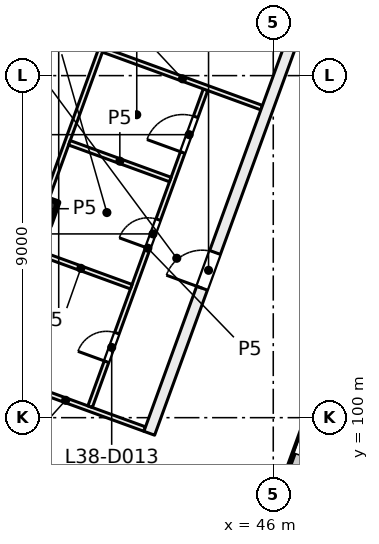
"""IFC4 building model, lengths in metres.
Left out: names, types, materials, properties, quantities, classifications, styles, units other than length and angle.
Written with IfcOpenShell. Run it as: python <this file> out.ifc"""

import sys

from ifc_helpers import new_model, si_unit, direction, frame, frame_2d, origin, origin_2d, place, context, subcontext, project, spatial, rectangle, extrude, element, fill, save


model = new_model("IFC4")
c1 = context("Model", 3, precision=1e-05, world=origin(), true_north=direction((0.0, 1.0)))
c2 = subcontext(c1, "Body", "Model", "MODEL_VIEW")
j1 = project(units=[si_unit("LENGTHUNIT", "METRE"), si_unit("PLANEANGLEUNIT", "RADIAN")], contexts=[c1])
p1 = place(None, origin())
s1 = spatial("IfcSite", under=j1, at=p1, CompositionType="ELEMENT")
p2 = place(p1, origin())
s2 = spatial("IfcBuilding", under=s1, at=p2, CompositionType="ELEMENT")
p3 = place(p2, frame((0.0, 0.0, 162.5)))
s3 = spatial("IfcBuildingStorey", under=s2, at=p3, CompositionType="ELEMENT", Elevation=162.5)
p4 = place(p3, frame((39.927, 105.468, 0.0), z_axis=(0.0, 0.0, 1.0), x_axis=(-0.342020143326, -0.939692620786, 0.0)))
e1 = element("IfcColumn", 1, at=p4, inside=s3, PredefinedType="COLUMN", context=c2, shape_type="SweptSolid", body=[
    extrude(rectangle(XDim=0.65, YDim=0.65, at=origin_2d()), origin(), (0.0, 0.0, 1.0), 4.0),
])
p5 = place(p3, frame((52.212, 113.783, 0.0), z_axis=(0.0, 0.0, 1.0), x_axis=(-0.34202521188, -0.939690775968, 0.0)))
e2 = element("IfcWall", 2, at=p5, inside=s3, PredefinedType="SOLIDWALL", context=c2, shape_type="SweptSolid", body=[
    extrude(rectangle(XDim=21.745, YDim=0.6, at=frame_2d((10.873, 0.0))), origin(), (0.0, 0.0, 1.0), 3.625),
])
p6 = place(p5, frame((3.765, 0.0, 0.9)))
e3 = element("IfcOpeningElement", 3, at=p6, cuts=e2, PredefinedType="OPENING", context=c2, shape_type="SweptSolid", body=[
    extrude(rectangle(XDim=3.0, YDim=2.4, at=frame_2d((1.5, 1.2))), frame((0.0, 0.31, 0.0), z_axis=(0.0, -1.0, 0.0), x_axis=(1.0, 0.0, 0.0)), (0.0, 0.0, 1.0), 0.62),
])
p7 = place(p5, frame((8.265, 0.0, 0.9)))
e4 = element("IfcOpeningElement", 4, at=p7, cuts=e2, PredefinedType="OPENING", context=c2, shape_type="SweptSolid", body=[
    extrude(rectangle(XDim=3.0, YDim=2.4, at=frame_2d((1.5, 1.2))), frame((0.0, 0.31, 0.0), z_axis=(0.0, -1.0, 0.0), x_axis=(1.0, 0.0, 0.0)), (0.0, 0.0, 1.0), 0.62),
])
p8 = place(p5, frame((12.765, 0.0, 0.9)))
e5 = element("IfcOpeningElement", 5, at=p8, cuts=e2, PredefinedType="OPENING", context=c2, shape_type="SweptSolid", body=[
    extrude(rectangle(XDim=3.0, YDim=2.4, at=frame_2d((1.5, 1.2))), frame((0.0, 0.31, 0.0), z_axis=(0.0, -1.0, 0.0), x_axis=(1.0, 0.0, 0.0)), (0.0, 0.0, 1.0), 0.62),
])
p9 = place(p5, frame((17.265, 0.0, 0.9)))
e6 = element("IfcOpeningElement", 6, at=p9, cuts=e2, PredefinedType="OPENING", context=c2, shape_type="SweptSolid", body=[
    extrude(rectangle(XDim=3.0, YDim=2.4, at=frame_2d((1.5, 1.2))), frame((0.0, 0.31, 0.0), z_axis=(0.0, -1.0, 0.0), x_axis=(1.0, 0.0, 0.0)), (0.0, 0.0, 1.0), 0.62),
])
p10 = place(p3, frame((38.455, 101.214, 0.0), z_axis=(0.0, 0.0, 1.0), x_axis=(0.939738687483, -0.341893549585, 0.0)))
e7 = element("IfcWall", 7, at=p10, inside=s3, PredefinedType="PARTITIONING", context=c2, shape_type="SweptSolid", body=[
    extrude(rectangle(XDim=4.429, YDim=0.125, at=frame_2d((2.214, 0.0))), origin(), (0.0, 0.0, 1.0), 3.625),
])
p11 = place(p3, frame((38.388, 101.24, 0.0), z_axis=(0.0, 0.0, 1.0), x_axis=(0.342067486799, 0.93967538782, 0.0)))
e8 = element("IfcWall", 8, at=p11, inside=s3, PredefinedType="PARTITIONING", context=c2, shape_type="SweptSolid", body=[
    extrude(rectangle(XDim=9.063, YDim=0.125, at=frame_2d((4.531, 0.0))), origin(), (0.0, 0.0, 1.0), 3.625),
])
p12 = place(p3, frame((41.181, 100.29, 0.0), z_axis=(0.0, 0.0, 1.0), x_axis=(0.34222012082, 0.939619810831, 0.0)))
e9 = element("IfcWall", 9, at=p12, inside=s3, PredefinedType="PARTITIONING", context=c2, shape_type="SweptSolid", body=[
    extrude(rectangle(XDim=8.875, YDim=0.125, at=frame_2d((4.438, 0.0))), origin(), (0.0, 0.0, 1.0), 3.625),
])
p13 = place(p12, frame((1.258, 0.0, 0.0)))
e10 = element("IfcOpeningElement", 10, at=p13, cuts=e9, PredefinedType="OPENING", context=c2, shape_type="SweptSolid", body=[
    extrude(rectangle(XDim=0.8, YDim=2.1, at=frame_2d((0.4, 1.05))), frame((0.0, 0.073, 0.0), z_axis=(0.0, -1.0, 0.0), x_axis=(1.0, 0.0, 0.0)), (0.0, 0.0, 1.0), 0.145),
])
p14 = place(p12, frame((4.437, 0.0, 0.0)))
e11 = element("IfcOpeningElement", 11, at=p14, cuts=e9, PredefinedType="OPENING", context=c2, shape_type="SweptSolid", body=[
    extrude(rectangle(XDim=0.8, YDim=2.1, at=frame_2d((0.4, 1.05))), frame((0.0, 0.073, 0.0), z_axis=(0.0, -1.0, 0.0), x_axis=(1.0, 0.0, 0.0)), (0.0, 0.0, 1.0), 0.145),
])
p15 = place(p12, frame((7.116, 0.0, 0.0)))
e12 = element("IfcOpeningElement", 12, at=p15, cuts=e9, PredefinedType="OPENING", context=c2, shape_type="SweptSolid", body=[
    extrude(rectangle(XDim=1.0, YDim=2.1, at=frame_2d((0.5, 1.05))), frame((0.0, 0.073, 0.0), z_axis=(0.0, -1.0, 0.0), x_axis=(1.0, 0.0, 0.0)), (0.0, 0.0, 1.0), 0.145),
])
p16 = place(p3, frame((41.526, 109.676, 0.0), z_axis=(0.0, 0.0, 1.0), x_axis=(0.939577975992, -0.342334963203, 0.0)))
e13 = element("IfcWall", 13, at=p16, inside=s3, PredefinedType="PARTITIONING", context=c2, shape_type="SweptSolid", body=[
    extrude(rectangle(XDim=4.437, YDim=0.125, at=frame_2d((2.219, 0.0))), origin(), (0.0, 0.0, 1.0), 3.625),
])
p17 = place(p3, frame((42.264, 103.446, 0.0), z_axis=(0.0, 0.0, 1.0), x_axis=(-0.939563555473, 0.342374539396, 0.0)))
e14 = element("IfcWall", 14, at=p17, inside=s3, PredefinedType="PARTITIONING", context=c2, shape_type="SweptSolid", body=[
    extrude(rectangle(XDim=2.824, YDim=0.125, at=frame_2d((1.412, 0.0))), origin(), (0.0, 0.0, 1.0), 3.625),
])
p18 = place(p3, frame((42.737, 99.59, 0.0), z_axis=(0.0, 0.0, 1.0), x_axis=(0.341992703977, 0.939702607438, 0.0)))
e15 = element("IfcWall", 15, at=p18, inside=s3, PredefinedType="PARTITIONING", context=c2, shape_type="SweptSolid", body=[
    extrude(rectangle(XDim=23.006, YDim=0.3, at=frame_2d((11.503, 0.0))), origin(), (0.0, 0.0, 1.0), 3.625),
])
p19 = place(p18, frame((4.062, 0.0, 0.0)))
e16 = element("IfcOpeningElement", 16, at=p19, cuts=e15, PredefinedType="OPENING", context=c2, shape_type="SweptSolid", body=[
    extrude(rectangle(XDim=1.0, YDim=2.1, at=frame_2d((0.5, 1.05))), frame((0.0, 0.16, 0.0), z_axis=(0.0, -1.0, 0.0), x_axis=(1.0, 0.0, 0.0)), (0.0, 0.0, 1.0), 0.32),
])
p20 = place(p18, frame((14.912, 0.0, 0.0)))
e17 = element("IfcOpeningElement", 17, at=p20, cuts=e15, PredefinedType="OPENING", context=c2, shape_type="SweptSolid", body=[
    extrude(rectangle(XDim=1.8, YDim=2.1, at=frame_2d((0.9, 1.05))), frame((0.0, 0.16, 0.0), z_axis=(0.0, -1.0, 0.0), x_axis=(1.0, 0.0, 0.0)), (0.0, 0.0, 1.0), 0.32),
])
p21 = place(p3, frame((43.29, 106.266, 0.0), z_axis=(0.0, 0.0, 1.0), x_axis=(-0.939601484935, 0.342270433294, 0.0)))
e18 = element("IfcWall", 18, at=p21, inside=s3, PredefinedType="PARTITIONING", context=c2, shape_type="SweptSolid", body=[
    extrude(rectangle(XDim=2.825, YDim=0.125, at=frame_2d((1.412, 0.0))), origin(), (0.0, 0.0, 1.0), 3.625),
])
p22 = place(p19, origin())
e19 = element("IfcDoor", 19, at=p22, inside=s3, OperationType="SINGLE_SWING_LEFT", PredefinedType="DOOR", context=c2, shape_type="SweptSolid", body=[
    extrude(rectangle(XDim=1.0, YDim=2.1, at=frame_2d((0.5, 1.05))), frame((0.0, 0.025, 0.0), z_axis=(0.0, -1.0, 0.0), x_axis=(1.0, 0.0, 0.0)), (0.0, 0.0, 1.0), 0.05),
])
fill(e16, e19)
p23 = place(p13, origin())
e20 = element("IfcDoor", 20, at=p23, inside=s3, OperationType="SINGLE_SWING_LEFT", PredefinedType="DOOR", context=c2, shape_type="SweptSolid", body=[
    extrude(rectangle(XDim=0.8, YDim=2.1, at=frame_2d((0.4, 1.05))), frame((0.0, 0.025, 0.0), z_axis=(0.0, -1.0, 0.0), x_axis=(1.0, 0.0, 0.0)), (0.0, 0.0, 1.0), 0.05),
])
fill(e10, e20)
p24 = place(p14, origin())
e21 = element("IfcDoor", 21, at=p24, inside=s3, OperationType="SINGLE_SWING_LEFT", PredefinedType="DOOR", context=c2, shape_type="SweptSolid", body=[
    extrude(rectangle(XDim=0.8, YDim=2.1, at=frame_2d((0.4, 1.05))), frame((0.0, 0.025, 0.0), z_axis=(0.0, -1.0, 0.0), x_axis=(1.0, 0.0, 0.0)), (0.0, 0.0, 1.0), 0.05),
])
fill(e11, e21)
p25 = place(p15, origin())
e22 = element("IfcDoor", 22, at=p25, inside=s3, OperationType="SINGLE_SWING_LEFT", PredefinedType="DOOR", context=c2, shape_type="SweptSolid", body=[
    extrude(rectangle(XDim=1.0, YDim=2.1, at=frame_2d((0.5, 1.05))), frame((0.0, 0.025, 0.0), z_axis=(0.0, -1.0, 0.0), x_axis=(1.0, 0.0, 0.0)), (0.0, 0.0, 1.0), 0.05),
])
fill(e12, e22)
save(model, sys.argv[1])
